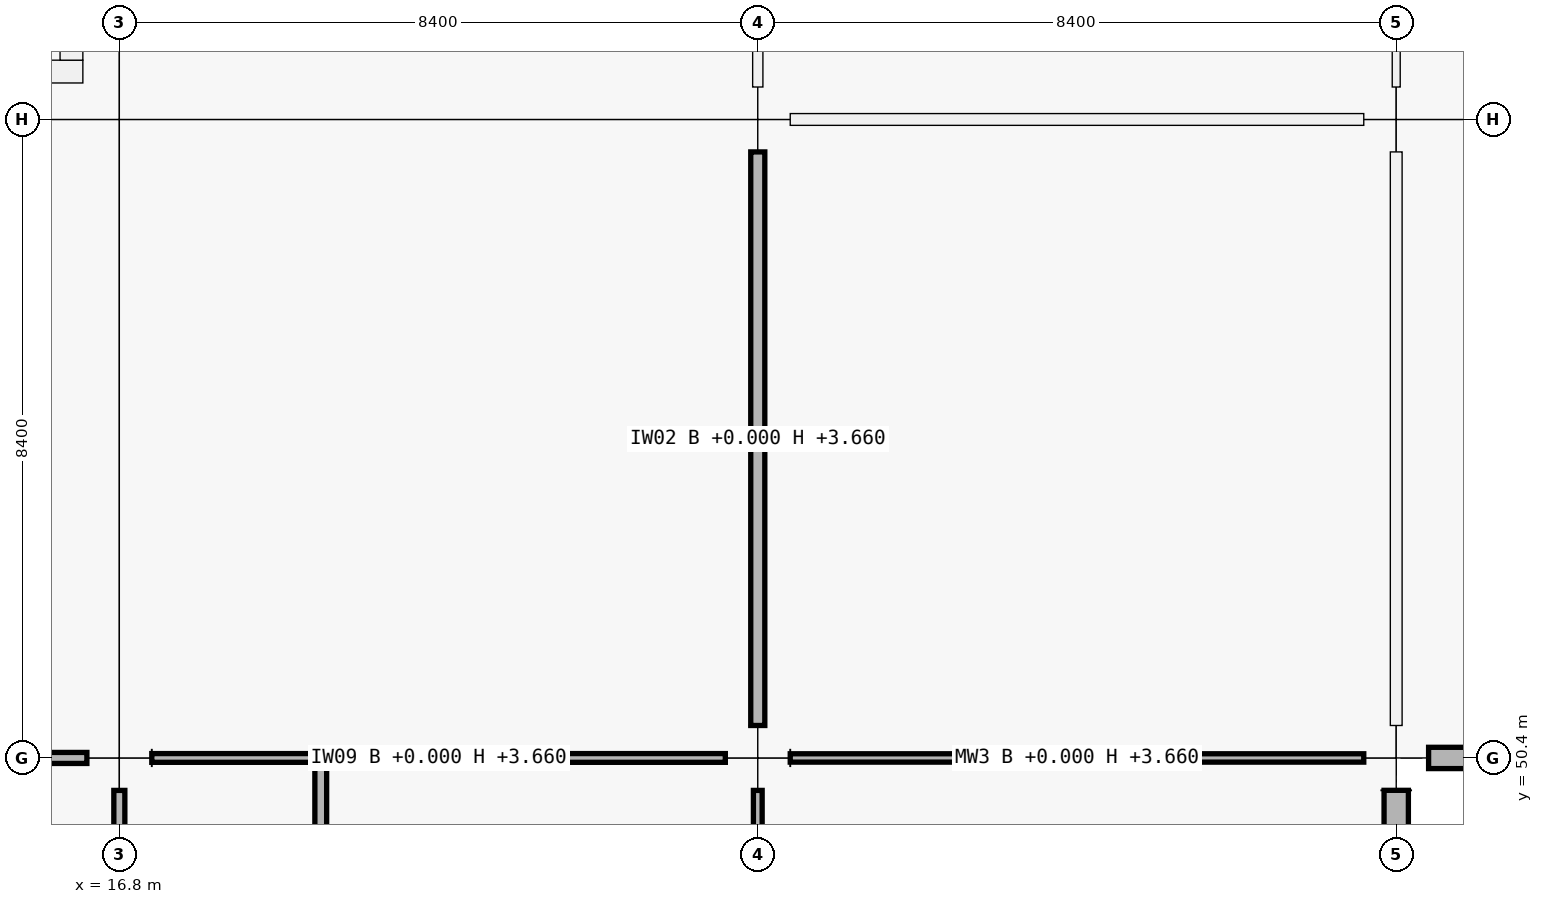
"""IFC4 building model, lengths in metres.
Left out: names, types, materials, properties, quantities, classifications, styles, units other than length and angle.
Written with IfcOpenShell. Run it as: python <this file> out.ifc"""

import sys

from ifc_helpers import new_model, si_unit, direction, frame, frame_2d, origin, origin_2d, place, context, subcontext, project, spatial, rectangle, extrude, element, fill, save


model = new_model("IFC4")
c1 = context("Model", 3, precision=1e-05, world=origin(), true_north=direction((0.0, 1.0)))
c2 = subcontext(c1, "Body", "Model", "MODEL_VIEW")
j1 = project(units=[si_unit("LENGTHUNIT", "METRE"), si_unit("PLANEANGLEUNIT", "RADIAN")], contexts=[c1])
p1 = place(None, origin())
s1 = spatial("IfcSite", under=j1, at=p1, CompositionType="ELEMENT")
p2 = place(p1, origin())
s2 = spatial("IfcBuilding", under=s1, at=p2, CompositionType="ELEMENT")
p3 = place(p2, origin())
s3 = spatial("IfcBuildingStorey", under=s2, at=p3, CompositionType="ELEMENT", Elevation=0.0)
for number, where, z_axis, x_axis in (
    (1, (16.8, 50.4, 0.0), (0.0, 0.0, 1.0), (1.0, 0.0, 0.0)),
    (2, (16.8, 58.8, 0.0), (0.0, 0.0, 1.0), (1.0, 0.0, 0.0)),
    (3, (25.2, 50.4, 0.0), (0.0, 0.0, 1.0), (1.0, 0.0, 0.0)),
    (4, (25.2, 58.8, 0.0), (0.0, 0.0, 1.0), (1.0, 0.0, 0.0)),
    (5, (33.6, 50.4, 0.0), (0.0, 0.0, 1.0), (1.0, 0.0, 0.0)),
    (6, (33.6, 58.8, 0.0), (0.0, 0.0, 1.0), (1.0, 0.0, 0.0)),
):
    element("IfcColumn", number, at=place(p3, frame(where, z_axis=z_axis, x_axis=x_axis)), inside=s3, PredefinedType="COLUMN", context=c2, shape_type="SweptSolid", body=[
        extrude(rectangle(XDim=0.85, YDim=0.85, at=origin_2d()), origin(), (0.0, 0.0, 1.0), 5.76),
    ])
p4 = place(p3, frame((33.6, 49.974, 0.0), z_axis=(0.0, 0.0, 1.0), x_axis=(0.0, -1.0, 0.0)))
e7 = element("IfcWall", 7, at=p4, inside=s3, PredefinedType="SOLIDWALL", context=c2, shape_type="SweptSolid", body=[
    extrude(rectangle(XDim=7.548, YDim=0.32, at=frame_2d((3.774, 0.0))), origin(), (0.0, 0.0, 1.0), 4.7),
])
p5 = place(p4, frame((2.674, 0.0, 0.9)))
e8 = element("IfcOpeningElement", 8, at=p5, cuts=e7, PredefinedType="OPENING", context=c2, shape_type="SweptSolid", body=[
    extrude(rectangle(XDim=2.2, YDim=1.75, at=frame_2d((1.1, 0.875))), frame((0.0, 0.16, 0.0), z_axis=(0.0, -1.0, 0.0), x_axis=(1.0, 0.0, 0.0)), (0.0, 0.0, 1.0), 0.32),
])
p6 = place(p3, frame((41.599, 50.4, 0.0), z_axis=(0.0, 0.0, 1.0), x_axis=(-1.0, 0.0, 0.0)))
e9 = element("IfcWall", 9, at=p6, inside=s3, PredefinedType="SOLIDWALL", context=c2, shape_type="SweptSolid", body=[
    extrude(rectangle(XDim=7.573, YDim=0.28, at=frame_2d((3.787, 0.0))), origin(), (0.0, 0.0, 1.0), 4.7),
])
p7 = place(p3, frame((16.32, 59.43, 0.0), z_axis=(0.0, 0.0, 1.0), x_axis=(-1.0, 0.0, 0.0)))
e10 = element("IfcWall", 10, at=p7, inside=s3, PredefinedType="SHEAR", context=c2, shape_type="SweptSolid", body=[
    extrude(rectangle(XDim=7.44, YDim=0.3, at=frame_2d((3.72, 0.0))), origin(), (0.0, 0.0, 1.0), 5.76),
])
p8 = place(p7, frame((1.28, 0.0, 0.0)))
e11 = element("IfcOpeningElement", 11, at=p8, cuts=e10, PredefinedType="OPENING", context=c2, shape_type="SweptSolid", body=[
    extrude(rectangle(XDim=1.5, YDim=2.15, at=frame_2d((0.75, 1.075))), frame((0.0, 0.15, 0.0), z_axis=(0.0, -1.0, 0.0), x_axis=(1.0, 0.0, 0.0)), (0.0, 0.0, 1.0), 0.3),
])
p9 = place(p3, frame((16.17, 66.42, 0.0), z_axis=(0.0, 0.0, 1.0), x_axis=(0.0, -1.0, 0.0)))
e12 = element("IfcWall", 12, at=p9, inside=s3, PredefinedType="SHEAR", context=c2, shape_type="SweptSolid", body=[
    extrude(rectangle(XDim=6.84, YDim=0.3, at=frame_2d((3.42, 0.0))), origin(), (0.0, 0.0, 1.0), 5.76),
])
p10 = place(p3, frame((8.827, 50.4, 0.0), z_axis=(0.0, 0.0, 1.0), x_axis=(1.0, 0.0, 0.0)))
e13 = element("IfcWall", 13, at=p10, inside=s3, PredefinedType="PARTITIONING", context=c2, shape_type="SweptSolid", body=[
    extrude(rectangle(XDim=7.546, YDim=0.145, at=frame_2d((3.773, 0.0))), origin(), (0.0, 0.0, 1.0), 3.66),
])
p11 = place(p10, frame((3.263, 0.0, 0.0)))
e14 = element("IfcOpeningElement", 14, at=p11, cuts=e13, PredefinedType="OPENING", context=c2, shape_type="SweptSolid", body=[
    extrude(rectangle(XDim=1.02, YDim=2.2, at=frame_2d((0.51, 1.1))), frame((0.0, 0.073, 0.0), z_axis=(0.0, -1.0, 0.0), x_axis=(1.0, 0.0, 0.0)), (0.0, 0.0, 1.0), 0.145),
])
p12 = place(p3, frame((17.227, 50.4, 0.0), z_axis=(0.0, 0.0, 1.0), x_axis=(1.0, 0.0, 0.0)))
e15 = element("IfcWall", 15, at=p12, inside=s3, PredefinedType="PARTITIONING", context=c2, shape_type="SweptSolid", body=[
    extrude(rectangle(XDim=7.546, YDim=0.115, at=frame_2d((3.773, 0.0))), origin(), (0.0, 0.0, 1.0), 3.66),
])
p13 = place(p12, frame((0.578, 0.0, 0.0)))
e16 = element("IfcOpeningElement", 16, at=p13, cuts=e15, PredefinedType="OPENING", context=c2, shape_type="SweptSolid", body=[
    extrude(rectangle(XDim=0.92, YDim=2.1, at=frame_2d((0.46, 1.05))), frame((0.0, 0.058, 0.0), z_axis=(0.0, -1.0, 0.0), x_axis=(1.0, 0.0, 0.0)), (0.0, 0.0, 1.0), 0.115),
])
p14 = place(p12, frame((4.468, 0.0, 0.0)))
e17 = element("IfcOpeningElement", 17, at=p14, cuts=e15, PredefinedType="OPENING", context=c2, shape_type="SweptSolid", body=[
    extrude(rectangle(XDim=0.98, YDim=2.08, at=frame_2d((0.49, 1.04))), frame((0.0, 0.058, 0.0), z_axis=(0.0, -1.0, 0.0), x_axis=(1.0, 0.0, 0.0)), (0.0, 0.0, 1.0), 0.115),
])
p15 = place(p3, frame((25.627, 50.4, 0.0), z_axis=(0.0, 0.0, 1.0), x_axis=(1.0, 0.0, 0.0)))
e18 = element("IfcWall", 18, at=p15, inside=s3, PredefinedType="MOVABLE", context=c2, shape_type="SweptSolid", body=[
    extrude(rectangle(XDim=7.546, YDim=0.11, at=frame_2d((3.773, 0.0))), origin(), (0.0, 0.0, 1.0), 3.66),
])
p16 = place(p15, frame((3.233, 0.0, 0.0)))
e19 = element("IfcOpeningElement", 19, at=p16, cuts=e18, PredefinedType="OPENING", context=c2, shape_type="SweptSolid", body=[
    extrude(rectangle(XDim=1.08, YDim=2.25, at=frame_2d((0.54, 1.125))), frame((0.0, 0.055, 0.0), z_axis=(0.0, -1.0, 0.0), x_axis=(1.0, 0.0, 0.0)), (0.0, 0.0, 1.0), 0.11),
])
p17 = place(p3, frame((25.627, 58.8, 0.0), z_axis=(0.0, 0.0, 1.0), x_axis=(1.0, 0.0, 0.0)))
e20 = element("IfcWall", 20, at=p17, inside=s3, PredefinedType="PARTITIONING", context=c2, shape_type="SweptSolid", body=[
    extrude(rectangle(XDim=7.546, YDim=0.155, at=frame_2d((3.773, 0.0))), origin(), (0.0, 0.0, 1.0), 3.66),
])
p18 = place(p17, frame((3.243, 0.0, 0.0)))
e21 = element("IfcOpeningElement", 21, at=p18, cuts=e20, PredefinedType="OPENING", context=c2, shape_type="SweptSolid", body=[
    extrude(rectangle(XDim=1.06, YDim=2.25, at=frame_2d((0.53, 1.125))), frame((0.0, 0.078, 0.0), z_axis=(0.0, -1.0, 0.0), x_axis=(1.0, 0.0, 0.0)), (0.0, 0.0, 1.0), 0.155),
])
p19 = place(p3, frame((16.8, 42.427, 0.0), z_axis=(0.0, 0.0, 1.0), x_axis=(0.0, 1.0, 0.0)))
e22 = element("IfcWall", 22, at=p19, inside=s3, PredefinedType="PARTITIONING", context=c2, shape_type="SweptSolid", body=[
    extrude(rectangle(XDim=7.546, YDim=0.145, at=frame_2d((3.773, 0.0))), origin(), (0.0, 0.0, 1.0), 3.66),
])
p20 = place(p3, frame((25.2, 42.427, 0.0), z_axis=(0.0, 0.0, 1.0), x_axis=(0.0, 1.0, 0.0)))
e23 = element("IfcWall", 23, at=p20, inside=s3, PredefinedType="PARTITIONING", context=c2, shape_type="SweptSolid", body=[
    extrude(rectangle(XDim=7.546, YDim=0.115, at=frame_2d((3.773, 0.0))), origin(), (0.0, 0.0, 1.0), 3.66),
])
p21 = place(p3, frame((25.2, 50.827, 0.0), z_axis=(0.0, 0.0, 1.0), x_axis=(0.0, 1.0, 0.0)))
e24 = element("IfcWall", 24, at=p21, inside=s3, PredefinedType="PARTITIONING", context=c2, shape_type="SweptSolid", body=[
    extrude(rectangle(XDim=7.546, YDim=0.185, at=frame_2d((3.773, 0.0))), origin(), (0.0, 0.0, 1.0), 3.66),
])
p22 = place(p21, frame((3.303, 0.0, 0.0)))
e25 = element("IfcOpeningElement", 25, at=p22, cuts=e24, PredefinedType="OPENING", context=c2, shape_type="SweptSolid", body=[
    extrude(rectangle(XDim=0.94, YDim=2.15, at=frame_2d((0.47, 1.075))), frame((0.0, 0.093, 0.0), z_axis=(0.0, -1.0, 0.0), x_axis=(1.0, 0.0, 0.0)), (0.0, 0.0, 1.0), 0.185),
])
p23 = place(p3, frame((25.2, 59.227, 0.0), z_axis=(0.0, 0.0, 1.0), x_axis=(0.0, 1.0, 0.0)))
e26 = element("IfcWall", 26, at=p23, inside=s3, PredefinedType="PARTITIONING", context=c2, shape_type="SweptSolid", body=[
    extrude(rectangle(XDim=7.546, YDim=0.135, at=frame_2d((3.773, 0.0))), origin(), (0.0, 0.0, 1.0), 3.66),
])
p24 = place(p23, frame((3.313, 0.0, 0.0)))
e27 = element("IfcOpeningElement", 27, at=p24, cuts=e26, PredefinedType="OPENING", context=c2, shape_type="SweptSolid", body=[
    extrude(rectangle(XDim=0.92, YDim=2.15, at=frame_2d((0.46, 1.075))), frame((0.0, 0.067, 0.0), z_axis=(0.0, -1.0, 0.0), x_axis=(1.0, 0.0, 0.0)), (0.0, 0.0, 1.0), 0.135),
])
p25 = place(p3, frame((33.6, 50.827, 0.0), z_axis=(0.0, 0.0, 1.0), x_axis=(0.0, 1.0, 0.0)))
e28 = element("IfcWall", 28, at=p25, inside=s3, PredefinedType="PARTITIONING", context=c2, shape_type="SweptSolid", body=[
    extrude(rectangle(XDim=7.546, YDim=0.155, at=frame_2d((3.773, 0.0))), origin(), (0.0, 0.0, 1.0), 3.66),
])
p26 = place(p25, frame((3.048, 0.0, 0.0)))
e29 = element("IfcOpeningElement", 29, at=p26, cuts=e28, PredefinedType="OPENING", context=c2, shape_type="SweptSolid", body=[
    extrude(rectangle(XDim=1.45, YDim=2.2, at=frame_2d((0.725, 1.1))), frame((0.0, 0.078, 0.0), z_axis=(0.0, -1.0, 0.0), x_axis=(1.0, 0.0, 0.0)), (0.0, 0.0, 1.0), 0.155),
])
p27 = place(p3, frame((33.6, 59.227, 0.0), z_axis=(0.0, 0.0, 1.0), x_axis=(0.0, 1.0, 0.0)))
e30 = element("IfcWall", 30, at=p27, inside=s3, PredefinedType="PARTITIONING", context=c2, shape_type="SweptSolid", body=[
    extrude(rectangle(XDim=7.546, YDim=0.105, at=frame_2d((3.773, 0.0))), origin(), (0.0, 0.0, 1.0), 3.66),
])
p28 = place(p27, frame((3.073, 0.0, 0.0)))
e31 = element("IfcOpeningElement", 31, at=p28, cuts=e30, PredefinedType="OPENING", context=c2, shape_type="SweptSolid", body=[
    extrude(rectangle(XDim=1.4, YDim=2.25, at=frame_2d((0.7, 1.125))), frame((0.0, 0.052, 0.0), z_axis=(0.0, -1.0, 0.0), x_axis=(1.0, 0.0, 0.0)), (0.0, 0.0, 1.0), 0.105),
])
p29 = place(p3, frame((19.45, 42.084, 0.0), z_axis=(0.0, 0.0, 1.0), x_axis=(0.0, 1.0, 0.0)))
e32 = element("IfcWall", 32, at=p29, inside=s3, PredefinedType="PARTITIONING", context=c2, shape_type="SweptSolid", body=[
    extrude(rectangle(XDim=8.256, YDim=0.155, at=frame_2d((4.128, 0.0))), origin(), (0.0, 0.0, 1.0), 3.66),
])
p30 = place(p13, origin())
e33 = element("IfcDoor", 33, at=p30, inside=s3, OperationType="SINGLE_SWING_LEFT", PredefinedType="DOOR", context=c2, shape_type="SweptSolid", body=[
    extrude(rectangle(XDim=0.92, YDim=2.1, at=frame_2d((0.46, 1.05))), frame((0.0, 0.025, 0.0), z_axis=(0.0, -1.0, 0.0), x_axis=(1.0, 0.0, 0.0)), (0.0, 0.0, 1.0), 0.05),
])
fill(e16, e33)
p31 = place(p14, origin())
e34 = element("IfcDoor", 34, at=p31, inside=s3, OperationType="SINGLE_SWING_RIGHT", PredefinedType="DOOR", context=c2, shape_type="SweptSolid", body=[
    extrude(rectangle(XDim=0.98, YDim=2.08, at=frame_2d((0.49, 1.04))), frame((0.0, 0.025, 0.0), z_axis=(0.0, -1.0, 0.0), x_axis=(1.0, 0.0, 0.0)), (0.0, 0.0, 1.0), 0.05),
])
fill(e17, e34)
p32 = place(p22, origin())
e35 = element("IfcDoor", 35, at=p32, inside=s3, OperationType="SINGLE_SWING_LEFT", PredefinedType="DOOR", context=c2, shape_type="SweptSolid", body=[
    extrude(rectangle(XDim=0.94, YDim=2.15, at=frame_2d((0.47, 1.075))), frame((0.0, 0.025, 0.0), z_axis=(0.0, -1.0, 0.0), x_axis=(1.0, 0.0, 0.0)), (0.0, 0.0, 1.0), 0.05),
])
fill(e25, e35)
p33 = place(p26, origin())
e36 = element("IfcDoor", 36, at=p33, inside=s3, OperationType="DOUBLE_DOOR_SINGLE_SWING", PredefinedType="DOOR", context=c2, shape_type="SweptSolid", body=[
    extrude(rectangle(XDim=1.45, YDim=2.2, at=frame_2d((0.725, 1.1))), frame((0.0, 0.025, 0.0), z_axis=(0.0, -1.0, 0.0), x_axis=(1.0, 0.0, 0.0)), (0.0, 0.0, 1.0), 0.05),
])
fill(e29, e36)
p34 = place(p16, origin())
e37 = element("IfcDoor", 37, at=p34, inside=s3, OperationType="SINGLE_SWING_LEFT", PredefinedType="DOOR", context=c2, shape_type="SweptSolid", body=[
    extrude(rectangle(XDim=1.08, YDim=2.25, at=frame_2d((0.54, 1.125))), frame((0.0, 0.025, 0.0), z_axis=(0.0, -1.0, 0.0), x_axis=(1.0, 0.0, 0.0)), (0.0, 0.0, 1.0), 0.05),
])
fill(e19, e37)
p35 = place(p18, origin())
e38 = element("IfcDoor", 38, at=p35, inside=s3, OperationType="SINGLE_SWING_RIGHT", PredefinedType="DOOR", context=c2, shape_type="SweptSolid", body=[
    extrude(rectangle(XDim=1.06, YDim=2.25, at=frame_2d((0.53, 1.125))), frame((0.0, 0.025, 0.0), z_axis=(0.0, -1.0, 0.0), x_axis=(1.0, 0.0, 0.0)), (0.0, 0.0, 1.0), 0.05),
])
fill(e21, e38)
save(model, sys.argv[1])
